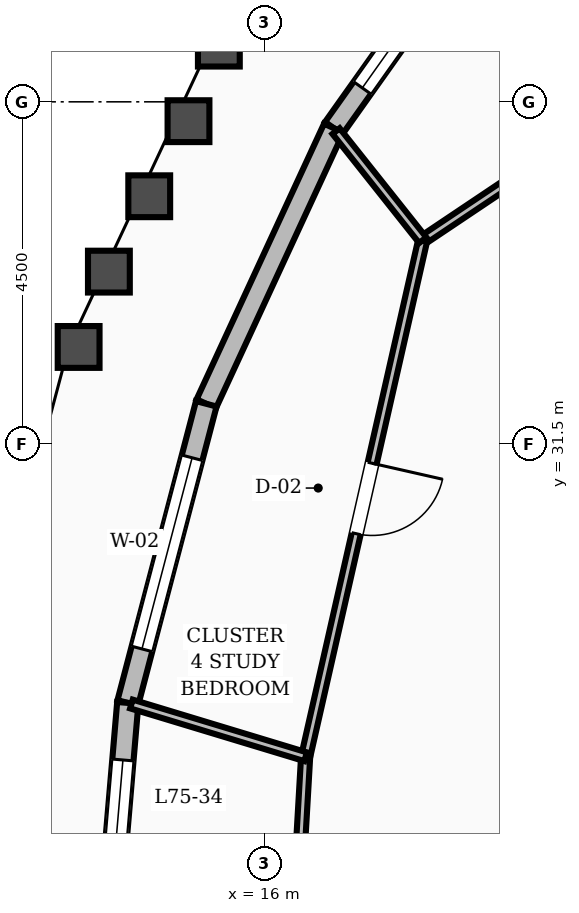
"""IFC4 building model, lengths in metres.
Left out: names, types, materials, properties, quantities, classifications, styles, units other than length and angle.
Written with IfcOpenShell. Run it as: python <this file> out.ifc"""

import sys

from ifc_helpers import new_model, si_unit, direction, frame, frame_2d, origin, place, context, subcontext, project, spatial, rectangle, extrude, element, fill, save


model = new_model("IFC4")
c1 = context("Model", 3, precision=1e-05, world=origin(), true_north=direction((0.0, 1.0)))
c2 = subcontext(c1, "Body", "Model", "MODEL_VIEW")
j1 = project(units=[si_unit("LENGTHUNIT", "METRE"), si_unit("PLANEANGLEUNIT", "RADIAN")], contexts=[c1])
p1 = place(None, origin())
s1 = spatial("IfcSite", under=j1, at=p1, CompositionType="ELEMENT")
p2 = place(p1, origin())
s2 = spatial("IfcBuilding", under=s1, at=p2, CompositionType="ELEMENT")
p3 = place(p2, frame((0.0, 0.0, 286.8)))
s3 = spatial("IfcBuildingStorey", under=s2, at=p3, CompositionType="ELEMENT", Elevation=286.8)
p4 = place(p3, frame((19.169, 38.833, 0.0), z_axis=(0.0, 0.0, 1.0), x_axis=(-0.578913591695, -0.815388897, 0.0)))
e1 = element("IfcWall", 1, at=p4, inside=s3, PredefinedType="STANDARD", context=c2, shape_type="SweptSolid", body=[
    extrude(rectangle(XDim=3.898, YDim=0.28, at=frame_2d((1.949, 0.0))), origin(), (0.0, 0.0, 1.0), 2.88),
])
p5 = place(p4, frame((0.649, 0.0, 0.8)))
e2 = element("IfcOpeningElement", 2, at=p5, cuts=e1, PredefinedType="OPENING", context=c2, shape_type="SweptSolid", body=[
    extrude(rectangle(XDim=2.6, YDim=1.65, at=frame_2d((1.3, 0.825))), frame((0.0, 0.15, 0.0), z_axis=(0.0, -1.0, 0.0), x_axis=(1.0, 0.0, 0.0)), (0.0, 0.0, 1.0), 0.3),
])
p6 = place(p3, frame((16.912, 35.654, 0.0), z_axis=(0.0, 0.0, 1.0), x_axis=(-0.41967808517, -0.90767301647, 0.0)))
e3 = element("IfcWall", 3, at=p6, inside=s3, PredefinedType="STANDARD", context=c2, shape_type="SweptSolid", body=[
    extrude(rectangle(XDim=3.995, YDim=0.28, at=frame_2d((1.998, 0.0))), origin(), (0.0, 0.0, 1.0), 2.88),
])
p7 = place(p3, frame((15.235, 32.027, 0.0), z_axis=(0.0, 0.0, 1.0), x_axis=(-0.253787245117, -0.967260065451, 0.0)))
e4 = element("IfcWall", 4, at=p7, inside=s3, PredefinedType="STANDARD", context=c2, shape_type="SweptSolid", body=[
    extrude(rectangle(XDim=4.068, YDim=0.28, at=frame_2d((2.034, 0.0))), origin(), (0.0, 0.0, 1.0), 2.88),
])
p8 = place(p7, frame((0.734, 0.0, 0.8)))
e5 = element("IfcOpeningElement", 5, at=p8, cuts=e4, PredefinedType="OPENING", context=c2, shape_type="SweptSolid", body=[
    extrude(rectangle(XDim=2.6, YDim=1.65, at=frame_2d((1.3, 0.825))), frame((0.0, 0.15, 0.0), z_axis=(0.0, -1.0, 0.0), x_axis=(1.0, 0.0, 0.0)), (0.0, 0.0, 1.0), 0.3),
])
p9 = place(p3, frame((14.203, 28.092, 0.0), z_axis=(0.0, 0.0, 1.0), x_axis=(-0.084944229557, -0.996385707377, 0.0)))
e6 = element("IfcWall", 6, at=p9, inside=s3, PredefinedType="STANDARD", context=c2, shape_type="SweptSolid", body=[
    extrude(rectangle(XDim=4.107, YDim=0.28, at=frame_2d((2.054, 0.0))), origin(), (0.0, 0.0, 1.0), 2.88),
])
p10 = place(p9, frame((0.754, 0.0, 0.8)))
e7 = element("IfcOpeningElement", 7, at=p10, cuts=e6, PredefinedType="OPENING", context=c2, shape_type="SweptSolid", body=[
    extrude(rectangle(XDim=2.6, YDim=1.65, at=frame_2d((1.3, 0.825))), frame((0.0, 0.15, 0.0), z_axis=(0.0, -1.0, 0.0), x_axis=(1.0, 0.0, 0.0)), (0.0, 0.0, 1.0), 0.3),
])
p11 = place(p3, frame((23.606, 37.881, 0.0), z_axis=(0.0, 0.0, 1.0), x_axis=(-0.830686252562, -0.556740828217, 0.0)))
e8 = element("IfcWall", 8, at=p11, inside=s3, PredefinedType="PARTITIONING", context=c2, shape_type="SweptSolid", body=[
    extrude(rectangle(XDim=6.648, YDim=0.12, at=frame_2d((3.324, 0.0))), origin(), (0.0, 0.0, 1.0), 2.87),
])
p12 = place(p11, frame((2.849, 0.0, 0.0)))
e9 = element("IfcOpeningElement", 9, at=p12, cuts=e8, PredefinedType="OPENING", context=c2, shape_type="SweptSolid", body=[
    extrude(rectangle(XDim=0.95, YDim=2.1, at=frame_2d((0.475, 1.05))), frame((0.0, 0.07, 0.0), z_axis=(0.0, -1.0, 0.0), x_axis=(1.0, 0.0, 0.0)), (0.0, 0.0, 1.0), 0.14),
])
p13 = place(p3, frame((18.083, 34.18, 0.0), z_axis=(0.0, 0.0, 1.0), x_axis=(-0.22107591462, -0.975256602118, 0.0)))
e10 = element("IfcWall", 10, at=p13, inside=s3, PredefinedType="PARTITIONING", context=c2, shape_type="SweptSolid", body=[
    extrude(rectangle(XDim=6.968, YDim=0.12, at=frame_2d((3.484, 0.0))), origin(), (0.0, 0.0, 1.0), 2.87),
])
p14 = place(p13, frame((3.009, 0.0, 0.0)))
e11 = element("IfcOpeningElement", 11, at=p14, cuts=e10, PredefinedType="OPENING", context=c2, shape_type="SweptSolid", body=[
    extrude(rectangle(XDim=0.95, YDim=2.1, at=frame_2d((0.475, 1.05))), frame((0.0, 0.07, 0.0), z_axis=(0.0, -1.0, 0.0), x_axis=(1.0, 0.0, 0.0)), (0.0, 0.0, 1.0), 0.14),
])
p15 = place(p3, frame((18.083, 34.18, 0.0), z_axis=(0.0, 0.0, 1.0), x_axis=(-0.621896561533, 0.783099397748, 0.0)))
e12 = element("IfcWall", 12, at=p15, inside=s3, PredefinedType="PARTITIONING", context=c2, shape_type="SweptSolid", body=[
    extrude(rectangle(XDim=1.833, YDim=0.12, at=frame_2d((0.916, 0.0))), origin(), (0.0, 0.0, 1.0), 2.87),
])
p16 = place(p3, frame((16.542, 27.384, 0.0), z_axis=(0.0, 0.0, 1.0), x_axis=(-0.057624147088, -0.998338348293, 0.0)))
e13 = element("IfcWall", 13, at=p16, inside=s3, PredefinedType="PARTITIONING", context=c2, shape_type="SweptSolid", body=[
    extrude(rectangle(XDim=3.389, YDim=0.12, at=frame_2d((1.695, 0.0))), origin(), (0.0, 0.0, 1.0), 2.87),
])
p17 = place(p16, frame((1.22, 0.0, 0.0)))
e14 = element("IfcOpeningElement", 14, at=p17, cuts=e13, PredefinedType="OPENING", context=c2, shape_type="SweptSolid", body=[
    extrude(rectangle(XDim=0.95, YDim=2.1, at=frame_2d((0.475, 1.05))), frame((0.0, 0.07, 0.0), z_axis=(0.0, -1.0, 0.0), x_axis=(1.0, 0.0, 0.0)), (0.0, 0.0, 1.0), 0.14),
])
p18 = place(p3, frame((16.542, 27.384, 0.0), z_axis=(0.0, 0.0, 1.0), x_axis=(-0.957068126057, 0.289863074718, 0.0)))
e15 = element("IfcWall", 15, at=p18, inside=s3, PredefinedType="PARTITIONING", context=c2, shape_type="SweptSolid", body=[
    extrude(rectangle(XDim=2.395, YDim=0.12, at=frame_2d((1.197, 0.0))), origin(), (0.0, 0.0, 1.0), 2.87),
])
p19 = place(p5, origin())
e16 = element("IfcWindow", 16, at=p19, inside=s3, PartitioningType="SINGLE_PANEL", PredefinedType="WINDOW", context=c2, shape_type="SweptSolid", body=[
    extrude(rectangle(XDim=2.6, YDim=1.65, at=frame_2d((1.3, 0.825))), frame((0.0, 0.03, 0.0), z_axis=(0.0, -1.0, 0.0), x_axis=(1.0, 0.0, 0.0)), (0.0, 0.0, 1.0), 0.06),
])
fill(e2, e16)
p20 = place(p8, origin())
e17 = element("IfcWindow", 17, at=p20, inside=s3, PartitioningType="SINGLE_PANEL", PredefinedType="WINDOW", context=c2, shape_type="SweptSolid", body=[
    extrude(rectangle(XDim=2.6, YDim=1.65, at=frame_2d((1.3, 0.825))), frame((0.0, 0.03, 0.0), z_axis=(0.0, -1.0, 0.0), x_axis=(1.0, 0.0, 0.0)), (0.0, 0.0, 1.0), 0.06),
])
fill(e5, e17)
p21 = place(p10, origin())
e18 = element("IfcWindow", 18, at=p21, inside=s3, PartitioningType="SINGLE_PANEL", PredefinedType="WINDOW", context=c2, shape_type="SweptSolid", body=[
    extrude(rectangle(XDim=2.6, YDim=1.65, at=frame_2d((1.3, 0.825))), frame((0.0, 0.03, 0.0), z_axis=(0.0, -1.0, 0.0), x_axis=(1.0, 0.0, 0.0)), (0.0, 0.0, 1.0), 0.06),
])
fill(e7, e18)
p22 = place(p14, origin())
e19 = element("IfcDoor", 19, at=p22, inside=s3, OperationType="SINGLE_SWING_LEFT", PredefinedType="DOOR", context=c2, shape_type="SweptSolid", body=[
    extrude(rectangle(XDim=0.95, YDim=2.1, at=frame_2d((0.475, 1.05))), frame((0.0, 0.025, 0.0), z_axis=(0.0, -1.0, 0.0), x_axis=(1.0, 0.0, 0.0)), (0.0, 0.0, 1.0), 0.05),
])
fill(e11, e19)
save(model, sys.argv[1])
